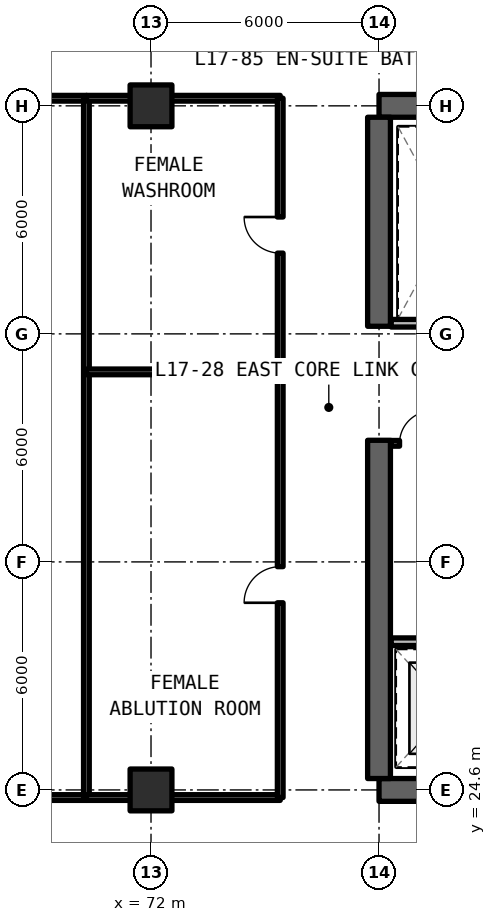
"""IFC4 building model, lengths in metres.
Left out: names, types, materials, properties, quantities, classifications, styles, units other than length and angle.
Written with IfcOpenShell. Run it as: python <this file> out.ifc"""

import sys

from ifc_helpers import new_model, si_unit, direction, frame, frame_2d, origin, origin_2d, place, context, subcontext, project, spatial, rectangle, extrude, element, fill, save


model = new_model("IFC4")
c1 = context("Model", 3, precision=1e-05, world=origin(), true_north=direction((0.0, 1.0)))
c2 = subcontext(c1, "Body", "Model", "MODEL_VIEW")
j1 = project(units=[si_unit("LENGTHUNIT", "METRE"), si_unit("PLANEANGLEUNIT", "RADIAN")], contexts=[c1])
p1 = place(None, origin())
s1 = spatial("IfcSite", under=j1, at=p1, CompositionType="ELEMENT")
p2 = place(p1, origin())
s2 = spatial("IfcBuilding", under=s1, at=p2, CompositionType="ELEMENT")
p3 = place(p2, frame((0.0, 0.0, 62.37)))
s3 = spatial("IfcBuildingStorey", under=s2, at=p3, CompositionType="ELEMENT", Elevation=62.37)
for number, where, z_axis, x_axis in (
    (1, (78.0, 24.6, 0.0), (0.0, 0.0, 1.0), (1.0, 0.0, 0.0)),
    (2, (90.0, 42.6, 0.0), (0.0, 0.0, 1.0), (-1.0, 0.0, 0.0)),
):
    element("IfcWall", number, at=place(p3, frame(where, z_axis=z_axis, x_axis=x_axis)), inside=s3, PredefinedType="SHEAR", context=c2, shape_type="SweptSolid", body=[
        extrude(rectangle(XDim=12.0, YDim=0.6, at=frame_2d((6.0, 0.0))), origin(), (0.0, 0.0, 1.0), 3.63),
    ])
p4 = place(p3, frame((78.0, 24.9, 0.0), z_axis=(0.0, 0.0, 1.0), x_axis=(0.0, 1.0, 0.0)))
e3 = element("IfcWall", 3, at=p4, inside=s3, PredefinedType="SHEAR", context=c2, shape_type="SweptSolid", body=[
    extrude(rectangle(XDim=8.9, YDim=0.6, at=frame_2d((4.45, 0.0))), origin(), (0.0, 0.0, 1.0), 3.63),
])
p5 = place(p3, frame((78.0, 36.8, 0.0), z_axis=(0.0, 0.0, 1.0), x_axis=(0.0, 1.0, 0.0)))
e4 = element("IfcWall", 4, at=p5, inside=s3, PredefinedType="SHEAR", context=c2, shape_type="SweptSolid", body=[
    extrude(rectangle(XDim=5.5, YDim=0.6, at=frame_2d((2.75, 0.0))), origin(), (0.0, 0.0, 1.0), 3.63),
])
for number, where, z_axis, x_axis in (
    (5, (72.0, 24.6, 0.0), (0.0, 0.0, 1.0), (1.0, 0.0, 0.0)),
    (6, (72.0, 42.6, 0.0), (0.0, 0.0, 1.0), (1.0, 0.0, 0.0)),
):
    element("IfcColumn", number, at=place(p3, frame(where, z_axis=z_axis, x_axis=x_axis)), inside=s3, PredefinedType="COLUMN", context=c2, shape_type="SweptSolid", body=[
        extrude(rectangle(XDim=1.1, YDim=1.1, at=origin_2d()), origin(), (0.0, 0.0, 1.0), 3.63),
    ])
p6 = place(p3, frame((78.32, 28.5, 0.0), z_axis=(0.0, 0.0, 1.0), x_axis=(1.0, 0.0, 0.0)))
e7 = element("IfcWall", 7, at=p6, inside=s3, PredefinedType="SOLIDWALL", context=c2, shape_type="SweptSolid", body=[
    extrude(rectangle(XDim=7.36, YDim=0.2, at=frame_2d((3.68, 0.0))), origin(), (0.0, 0.0, 1.0), 2.63),
])
p7 = place(p6, frame((3.48, 0.0, 0.0)))
e8 = element("IfcOpeningElement", 8, at=p7, cuts=e7, PredefinedType="OPENING", context=c2, shape_type="SweptSolid", body=[
    extrude(rectangle(XDim=1.0, YDim=2.15, at=frame_2d((0.5, 1.075))), frame((0.0, 0.11, 0.0), z_axis=(0.0, -1.0, 0.0), x_axis=(1.0, 0.0, 0.0)), (0.0, 0.0, 1.0), 0.22),
])
p8 = place(p3, frame((78.32, 33.72, 0.0), z_axis=(0.0, 0.0, 1.0), x_axis=(1.0, 0.0, 0.0)))
e9 = element("IfcWall", 9, at=p8, inside=s3, PredefinedType="SOLIDWALL", context=c2, shape_type="SweptSolid", body=[
    extrude(rectangle(XDim=1.32, YDim=0.15, at=frame_2d((0.66, 0.0))), origin(), (0.0, 0.0, 1.0), 2.63),
])
p9 = place(p8, frame((0.22, 0.0, 0.0)))
e10 = element("IfcOpeningElement", 10, at=p9, cuts=e9, PredefinedType="OPENING", context=c2, shape_type="SweptSolid", body=[
    extrude(rectangle(XDim=0.85, YDim=2.1, at=frame_2d((0.425, 1.05))), frame((0.0, 0.085, 0.0), z_axis=(0.0, -1.0, 0.0), x_axis=(1.0, 0.0, 0.0)), (0.0, 0.0, 1.0), 0.17),
])
p10 = place(p3, frame((78.32, 36.88, 0.0), z_axis=(0.0, 0.0, 1.0), x_axis=(1.0, 0.0, 0.0)))
e11 = element("IfcWall", 11, at=p10, inside=s3, PredefinedType="SOLIDWALL", context=c2, shape_type="SweptSolid", body=[
    extrude(rectangle(XDim=3.0, YDim=0.2, at=frame_2d((1.5, 0.0))), origin(), (0.0, 0.0, 1.0), 2.63),
])
p11 = place(p3, frame((42.9, 24.4, 0.0), z_axis=(0.0, 0.0, 1.0), x_axis=(1.0, 0.0, 0.0)))
e12 = element("IfcWall", 12, at=p11, inside=s3, PredefinedType="SOLIDWALL", context=c2, shape_type="SweptSolid", body=[
    extrude(rectangle(XDim=27.4, YDim=0.15, at=frame_2d((13.7, 0.0))), origin(), (0.0, 0.0, 1.0), 2.625),
])
p12 = place(p11, frame((13.0, 0.0, 0.0)))
e13 = element("IfcOpeningElement", 13, at=p12, cuts=e12, PredefinedType="OPENING", context=c2, shape_type="SweptSolid", body=[
    extrude(rectangle(XDim=1.4, YDim=2.15, at=frame_2d((0.7, 1.075))), frame((0.0, 0.085, 0.0), z_axis=(0.0, -1.0, 0.0), x_axis=(1.0, 0.0, 0.0)), (0.0, 0.0, 1.0), 0.17),
])
p13 = place(p3, frame((42.9, 42.8, 0.0), z_axis=(0.0, 0.0, 1.0), x_axis=(1.0, 0.0, 0.0)))
e14 = element("IfcWall", 14, at=p13, inside=s3, PredefinedType="SOLIDWALL", context=c2, shape_type="SweptSolid", body=[
    extrude(rectangle(XDim=27.4, YDim=0.15, at=frame_2d((13.7, 0.0))), origin(), (0.0, 0.0, 1.0), 2.625),
])
p14 = place(p3, frame((70.3, 24.4, 0.0), z_axis=(0.0, 0.0, 1.0), x_axis=(0.0, 1.0, 0.0)))
e15 = element("IfcWall", 15, at=p14, inside=s3, PredefinedType="SOLIDWALL", context=c2, shape_type="SweptSolid", body=[
    extrude(rectangle(XDim=18.4, YDim=0.15, at=frame_2d((9.2, 0.0))), origin(), (0.0, 0.0, 1.0), 2.63),
])
p15 = place(p3, frame((70.3, 24.4, 0.0), z_axis=(0.0, 0.0, 1.0), x_axis=(1.0, 0.0, 0.0)))
e16 = element("IfcWall", 16, at=p15, inside=s3, PredefinedType="SOLIDWALL", context=c2, shape_type="SweptSolid", body=[
    extrude(rectangle(XDim=5.1, YDim=0.15, at=frame_2d((2.55, 0.0))), origin(), (0.0, 0.0, 1.0), 2.625),
])
p16 = place(p3, frame((70.3, 35.6, 0.0), z_axis=(0.0, 0.0, 1.0), x_axis=(1.0, 0.0, 0.0)))
e17 = element("IfcWall", 17, at=p16, inside=s3, PredefinedType="SOLIDWALL", context=c2, shape_type="SweptSolid", body=[
    extrude(rectangle(XDim=5.1, YDim=0.15, at=frame_2d((2.55, 0.0))), origin(), (0.0, 0.0, 1.0), 2.63),
])
p17 = place(p3, frame((75.4, 24.4, 0.0), z_axis=(0.0, 0.0, 1.0), x_axis=(0.0, 1.0, 0.0)))
e18 = element("IfcWall", 18, at=p17, inside=s3, PredefinedType="SOLIDWALL", context=c2, shape_type="SweptSolid", body=[
    extrude(rectangle(XDim=11.2, YDim=0.15, at=frame_2d((5.6, 0.0))), origin(), (0.0, 0.0, 1.0), 2.63),
])
p18 = place(p17, frame((5.125, 0.0, 0.0)))
e19 = element("IfcOpeningElement", 19, at=p18, cuts=e18, PredefinedType="OPENING", context=c2, shape_type="SweptSolid", body=[
    extrude(rectangle(XDim=0.95, YDim=2.15, at=frame_2d((0.475, 1.075))), frame((0.0, 0.085, 0.0), z_axis=(0.0, -1.0, 0.0), x_axis=(1.0, 0.0, 0.0)), (0.0, 0.0, 1.0), 0.17),
])
p19 = place(p3, frame((70.3, 42.8, 0.0), z_axis=(0.0, 0.0, 1.0), x_axis=(1.0, 0.0, 0.0)))
e20 = element("IfcWall", 20, at=p19, inside=s3, PredefinedType="SOLIDWALL", context=c2, shape_type="SweptSolid", body=[
    extrude(rectangle(XDim=5.1, YDim=0.15, at=frame_2d((2.55, 0.0))), origin(), (0.0, 0.0, 1.0), 2.625),
])
p20 = place(p3, frame((75.4, 35.6, 0.0), z_axis=(0.0, 0.0, 1.0), x_axis=(0.0, 1.0, 0.0)))
e21 = element("IfcWall", 21, at=p20, inside=s3, PredefinedType="SOLIDWALL", context=c2, shape_type="SweptSolid", body=[
    extrude(rectangle(XDim=7.2, YDim=0.15, at=frame_2d((3.6, 0.0))), origin(), (0.0, 0.0, 1.0), 2.63),
])
p21 = place(p20, frame((3.125, 0.0, 0.0)))
e22 = element("IfcOpeningElement", 22, at=p21, cuts=e21, PredefinedType="OPENING", context=c2, shape_type="SweptSolid", body=[
    extrude(rectangle(XDim=0.95, YDim=2.15, at=frame_2d((0.475, 1.075))), frame((0.0, 0.085, 0.0), z_axis=(0.0, -1.0, 0.0), x_axis=(1.0, 0.0, 0.0)), (0.0, 0.0, 1.0), 0.17),
])
p22 = place(p9, origin())
e23 = element("IfcDoor", 23, at=p22, inside=s3, OperationType="SINGLE_SWING_RIGHT", PredefinedType="DOOR", context=c2, shape_type="SweptSolid", body=[
    extrude(rectangle(XDim=0.85, YDim=2.1, at=frame_2d((0.425, 1.05))), frame((0.0, 0.025, 0.0), z_axis=(0.0, -1.0, 0.0), x_axis=(1.0, 0.0, 0.0)), (0.0, 0.0, 1.0), 0.05),
])
fill(e10, e23)
p23 = place(p18, origin())
e24 = element("IfcDoor", 24, at=p23, inside=s3, OperationType="SINGLE_SWING_LEFT", PredefinedType="DOOR", context=c2, shape_type="SweptSolid", body=[
    extrude(rectangle(XDim=0.95, YDim=2.15, at=frame_2d((0.475, 1.075))), frame((0.0, 0.025, 0.0), z_axis=(0.0, -1.0, 0.0), x_axis=(1.0, 0.0, 0.0)), (0.0, 0.0, 1.0), 0.05),
])
fill(e19, e24)
p24 = place(p21, origin())
e25 = element("IfcDoor", 25, at=p24, inside=s3, OperationType="SINGLE_SWING_RIGHT", PredefinedType="DOOR", context=c2, shape_type="SweptSolid", body=[
    extrude(rectangle(XDim=0.95, YDim=2.15, at=frame_2d((0.475, 1.075))), frame((0.0, 0.025, 0.0), z_axis=(0.0, -1.0, 0.0), x_axis=(1.0, 0.0, 0.0)), (0.0, 0.0, 1.0), 0.05),
])
fill(e22, e25)
save(model, sys.argv[1])
